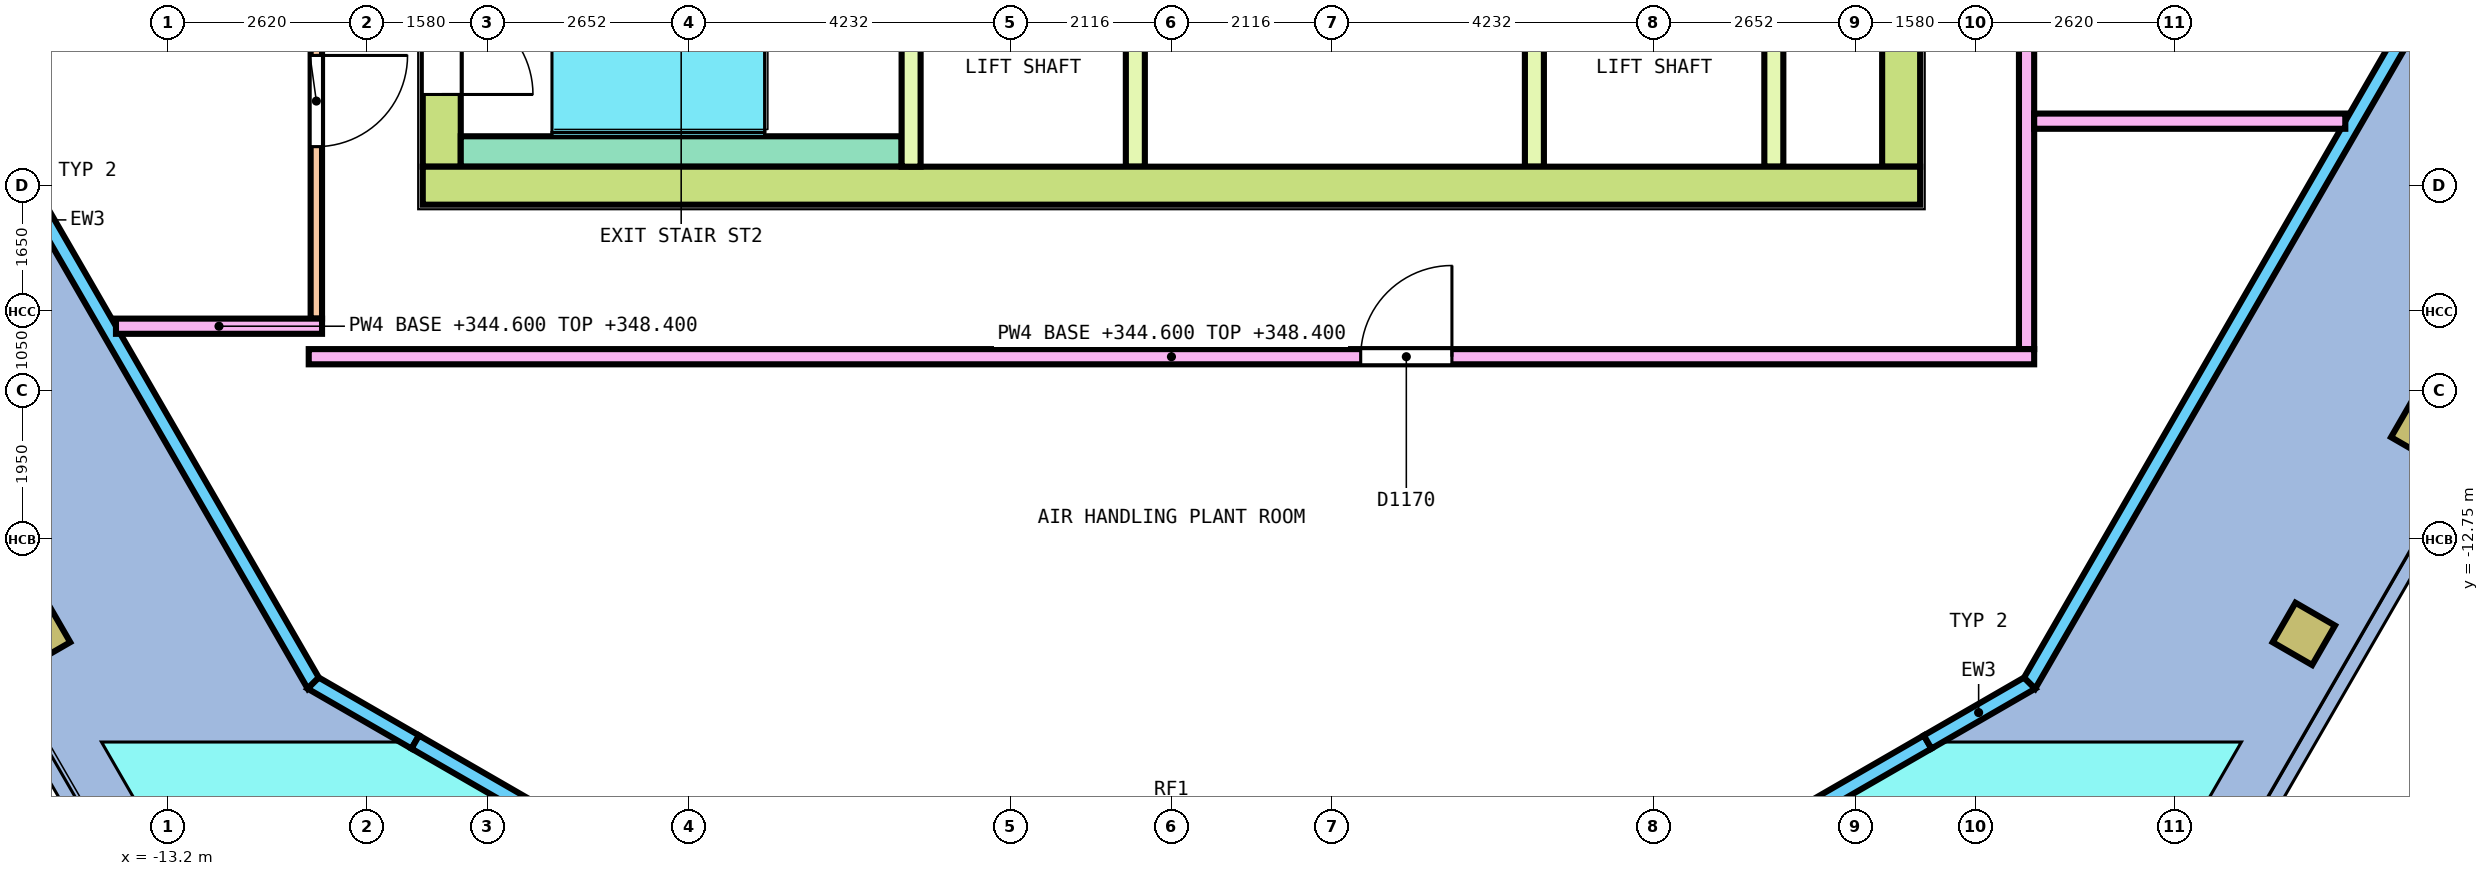
"""IFC4 building model, lengths in metres.
Left out: names, types, materials, properties, quantities, classifications, styles, units other than length and angle.
Written with IfcOpenShell. Run it as: python <this file> out.ifc"""

import sys

from ifc_helpers import new_model, si_unit, direction, frame, frame_2d, origin, origin_2d, place, context, subcontext, project, spatial, polyline, rectangle, hollow_rectangle, outline, extrude, element, fill, save


model = new_model("IFC4")
c1 = context("Model", 3, precision=1e-05, world=origin(), true_north=direction((0.0, 1.0)))
c2 = subcontext(c1, "Body", "Model", "MODEL_VIEW")
j1 = project(units=[si_unit("LENGTHUNIT", "METRE"), si_unit("PLANEANGLEUNIT", "RADIAN")], contexts=[c1])
p1 = place(None, origin())
s1 = spatial("IfcSite", under=j1, at=p1, CompositionType="ELEMENT")
p2 = place(p1, origin())
s2 = spatial("IfcBuilding", under=s1, at=p2, CompositionType="ELEMENT")
p3 = place(p2, frame((0.0, 0.0, 344.6)))
s3 = spatial("IfcBuildingStorey", under=s2, at=p3, CompositionType="ELEMENT", Elevation=344.6)
for number, where, z_axis, x_axis in (
    (1, (-14.898, -13.996, 0.0), (0.0, 0.0, 1.0), (0.5, -0.866, 0.0)),
    (2, (14.898, -13.996, 0.0), (0.0, 0.0, 1.0), (0.5, 0.866, 0.0)),
    (3, (16.455, -11.299, 0.0), (0.0, 0.0, 1.0), (0.5, 0.866, 0.0)),
):
    element("IfcColumn", number, at=place(p3, frame(where, z_axis=z_axis, x_axis=x_axis)), inside=s3, PredefinedType="COLUMN", context=c2, shape_type="SweptSolid", body=[
        extrude(hollow_rectangle(XDim=0.6, YDim=0.6, WallThickness=0.04, InnerFilletRadius=0.04, OuterFilletRadius=0.08, at=origin_2d()), origin(), (0.0, 0.0, 1.0), 4.0),
    ])
p4 = place(p3, frame((-18.327, -2.456, 0.0), z_axis=(0.0, 0.0, 1.0), x_axis=(0.499991740577, -0.866030172312, 0.0)))
e4 = element("IfcWall", 4, at=p4, inside=s3, PredefinedType="SOLIDWALL", context=c2, shape_type="SweptSolid", body=[
    extrude(outline(polyline([(-0.027, -0.1), (14.101, -0.1), (14.047, 0.1), (0.027, 0.1), (-0.027, -0.1)])), origin(), (0.0, 0.0, 1.0), 3.8),
])
p5 = place(p3, frame((-11.291, -14.644, 0.0), z_axis=(0.0, 0.0, 1.0), x_axis=(0.866004557827, -0.500036104519, 0.0)))
e5 = element("IfcWall", 5, at=p5, inside=s3, PredefinedType="SOLIDWALL", context=c2, shape_type="SweptSolid", body=[
    extrude(outline(polyline([(-0.027, -0.1), (1.55, -0.1), (1.55, 0.1), (0.027, 0.1), (-0.027, -0.1)])), origin(), (0.0, 0.0, 1.0), 3.8),
])
p6 = place(p3, frame((-9.948, -15.419, 0.0), z_axis=(0.0, 0.0, 1.0), x_axis=(0.866022320763, -0.500005339912, 0.0)))
e6 = element("IfcWall", 6, at=p6, inside=s3, PredefinedType="SOLIDWALL", context=c2, shape_type="SweptSolid", body=[
    extrude(outline(polyline([(0.0, 0.0), (3.362, 0.0), (3.362, 0.225), (0.0, 4.0), (0.0, 0.0)])), frame((0.0, 0.1, 0.0), z_axis=(0.0, -1.0, 0.0), x_axis=(1.0, 0.0, 0.0)), (0.0, 0.0, 1.0), 0.2),
])
p7 = place(p3, frame((7.037, -17.1, 0.0), z_axis=(0.0, 0.0, 1.0), x_axis=(0.866022320763, 0.500005339912, 0.0)))
e7 = element("IfcWall", 7, at=p7, inside=s3, PredefinedType="SOLIDWALL", context=c2, shape_type="SweptSolid", body=[
    extrude(outline(polyline([(0.0, 0.0), (3.362, 0.0), (3.362, 4.0), (0.0, 0.225), (0.0, 0.0)])), frame((0.0, 0.1, 0.0), z_axis=(0.0, -1.0, 0.0), x_axis=(1.0, 0.0, 0.0)), (0.0, 0.0, 1.0), 0.2),
])
p8 = place(p3, frame((9.948, -15.419, 0.0), z_axis=(0.0, 0.0, 1.0), x_axis=(0.866004557827, 0.500036104519, 0.0)))
e8 = element("IfcWall", 8, at=p8, inside=s3, PredefinedType="SOLIDWALL", context=c2, shape_type="SweptSolid", body=[
    extrude(outline(polyline([(0.0, -0.1), (1.577, -0.1), (1.523, 0.1), (0.0, 0.1), (0.0, -0.1)])), origin(), (0.0, 0.0, 1.0), 3.8),
])
p9 = place(p3, frame((11.291, -14.644, 0.0), z_axis=(0.0, 0.0, 1.0), x_axis=(0.499991740577, 0.866030172312, 0.0)))
e9 = element("IfcWall", 9, at=p9, inside=s3, PredefinedType="SOLIDWALL", context=c2, shape_type="SweptSolid", body=[
    extrude(outline(polyline([(-0.027, -0.1), (14.101, -0.1), (14.047, 0.1), (0.027, 0.1), (-0.027, -0.1)])), origin(), (0.0, 0.0, 1.0), 3.8),
])
p10 = place(p3, frame((-9.85, -8.1, 0.0), z_axis=(0.0, 0.0, 1.0), x_axis=(1.0, 0.0, 0.0)))
e10 = element("IfcWall", 10, at=p10, inside=s3, PredefinedType="SHEAR", context=c2, shape_type="SweptSolid", body=[
    extrude(rectangle(XDim=19.7, YDim=0.5, at=frame_2d((9.85, 0.0))), origin(), (0.0, 0.0, 1.0), 3.8),
])
p11 = place(p3, frame((-9.6, -7.85, 0.0), z_axis=(0.0, 0.0, 1.0), x_axis=(0.0, 1.0, 0.0)))
e11 = element("IfcWall", 11, at=p11, inside=s3, PredefinedType="SHEAR", context=c2, shape_type="SweptSolid", body=[
    extrude(rectangle(XDim=15.7, YDim=0.5, at=frame_2d((7.85, 0.0))), origin(), (0.0, 0.0, 1.0), 3.8),
])
p12 = place(p11, frame((6.65, 0.0, 0.0)))
e12 = element("IfcOpeningElement", 12, at=p12, cuts=e11, PredefinedType="OPENING", context=c2, shape_type="SweptSolid", body=[
    extrude(rectangle(XDim=2.4, YDim=2.1, at=frame_2d((1.2, 1.05))), frame((0.0, 0.26, 0.0), z_axis=(0.0, -1.0, 0.0), x_axis=(1.0, 0.0, 0.0)), (0.0, 0.0, 1.0), 0.52),
])
p13 = place(p11, frame((13.55, 0.0, 0.0)))
e13 = element("IfcOpeningElement", 13, at=p13, cuts=e11, PredefinedType="OPENING", context=c2, shape_type="SweptSolid", body=[
    extrude(rectangle(XDim=1.2, YDim=2.1, at=frame_2d((0.6, 1.05))), frame((0.0, 0.26, 0.0), z_axis=(0.0, -1.0, 0.0), x_axis=(1.0, 0.0, 0.0)), (0.0, 0.0, 1.0), 0.52),
])
p14 = place(p11, frame((0.95, 0.0, 0.0)))
e14 = element("IfcOpeningElement", 14, at=p14, cuts=e11, PredefinedType="OPENING", context=c2, shape_type="SweptSolid", body=[
    extrude(rectangle(XDim=1.2, YDim=2.1, at=frame_2d((0.6, 1.05))), frame((0.0, 0.26, 0.0), z_axis=(0.0, -1.0, 0.0), x_axis=(1.0, 0.0, 0.0)), (0.0, 0.0, 1.0), 0.52),
])
p15 = place(p3, frame((9.6, -7.85, 0.0), z_axis=(0.0, 0.0, 1.0), x_axis=(0.0, 1.0, 0.0)))
e15 = element("IfcWall", 15, at=p15, inside=s3, PredefinedType="SHEAR", context=c2, shape_type="SweptSolid", body=[
    extrude(rectangle(XDim=15.7, YDim=0.5, at=frame_2d((7.85, 0.0))), origin(), (0.0, 0.0, 1.0), 3.8),
])
p16 = place(p15, frame((6.65, 0.0, 0.0)))
e16 = element("IfcOpeningElement", 16, at=p16, cuts=e15, PredefinedType="OPENING", context=c2, shape_type="SweptSolid", body=[
    extrude(rectangle(XDim=2.4, YDim=2.1, at=frame_2d((1.2, 1.05))), frame((0.0, 0.26, 0.0), z_axis=(0.0, -1.0, 0.0), x_axis=(1.0, 0.0, 0.0)), (0.0, 0.0, 1.0), 0.52),
])
p17 = place(p15, frame((13.55, 0.0, 0.0)))
e17 = element("IfcOpeningElement", 17, at=p17, cuts=e15, PredefinedType="OPENING", context=c2, shape_type="SweptSolid", body=[
    extrude(rectangle(XDim=1.2, YDim=2.1, at=frame_2d((0.6, 1.05))), frame((0.0, 0.26, 0.0), z_axis=(0.0, -1.0, 0.0), x_axis=(1.0, 0.0, 0.0)), (0.0, 0.0, 1.0), 0.52),
])
p18 = place(p3, frame((-9.35, -7.65, 0.0), z_axis=(0.0, 0.0, 1.0), x_axis=(1.0, 0.0, 0.0)))
e18 = element("IfcWall", 18, at=p18, inside=s3, PredefinedType="SOLIDWALL", context=c2, shape_type="SweptSolid", body=[
    extrude(rectangle(XDim=5.8, YDim=0.4, at=frame_2d((2.9, 0.0))), origin(), (0.0, 0.0, 1.0), 3.8),
])
for number, where, z_axis, x_axis in (
    (19, (-3.425, -7.85, 0.0), (0.0, 0.0, 1.0), (0.0, 1.0, 0.0)),
    (20, (-0.475, -7.85, 0.0), (0.0, 0.0, 1.0), (0.0, 1.0, 0.0)),
    (21, (4.775, -7.85, 0.0), (0.0, 0.0, 1.0), (0.0, 1.0, 0.0)),
    (22, (7.925, -7.85, 0.0), (0.0, 0.0, 1.0), (0.0, 1.0, 0.0)),
):
    element("IfcWall", number, at=place(p3, frame(where, z_axis=z_axis, x_axis=x_axis)), inside=s3, PredefinedType="SOLIDWALL", context=c2, shape_type="SweptSolid", body=[
        extrude(rectangle(XDim=2.95, YDim=0.25, at=frame_2d((1.475, 0.0))), origin(), (0.0, 0.0, 1.0), 3.8),
    ])
p19 = place(p3, frame((-11.25, -9.849, 0.0), z_axis=(0.0, 0.0, 1.0), x_axis=(0.0, 1.0, 0.0)))
e23 = element("IfcWall", 23, at=p19, inside=s3, PredefinedType="PARTITIONING", context=c2, shape_type="SweptSolid", body=[
    extrude(rectangle(XDim=17.0, YDim=0.15, at=frame_2d((8.5, 0.0))), origin(), (0.0, 0.0, 1.0), 3.3),
])
p20 = place(p19, frame((14.212, 0.0, 0.0)))
e24 = element("IfcOpeningElement", 24, at=p20, cuts=e23, PredefinedType="OPENING", context=c2, shape_type="SweptSolid", body=[
    extrude(rectangle(XDim=1.2, YDim=2.1, at=frame_2d((0.6, 1.05))), frame((0.0, 0.085, 0.0), z_axis=(0.0, -1.0, 0.0), x_axis=(1.0, 0.0, 0.0)), (0.0, 0.0, 1.0), 0.17),
])
p21 = place(p19, frame((2.262, 0.0, 0.0)))
e25 = element("IfcOpeningElement", 25, at=p21, cuts=e23, PredefinedType="OPENING", context=c2, shape_type="SweptSolid", body=[
    extrude(rectangle(XDim=1.2, YDim=2.1, at=frame_2d((0.6, 1.05))), frame((0.0, 0.085, 0.0), z_axis=(0.0, -1.0, 0.0), x_axis=(1.0, 0.0, 0.0)), (0.0, 0.0, 1.0), 0.17),
])
p22 = place(p3, frame((11.25, -10.25, 0.0), z_axis=(0.0, 0.0, 1.0), x_axis=(0.0, 1.0, 0.0)))
e26 = element("IfcWall", 26, at=p22, inside=s3, PredefinedType="PARTITIONING", context=c2, shape_type="SweptSolid", body=[
    extrude(rectangle(XDim=20.099, YDim=0.2, at=frame_2d((10.049, 0.0))), origin(), (0.0, 0.0, 1.0), 3.3),
])
p23 = place(p22, frame((17.407, 0.0, 0.0)))
e27 = element("IfcOpeningElement", 27, at=p23, cuts=e26, PredefinedType="OPENING", context=c2, shape_type="SweptSolid", body=[
    extrude(rectangle(XDim=1.0, YDim=2.1, at=frame_2d((0.5, 1.05))), frame((0.0, 0.11, 0.0), z_axis=(0.0, -1.0, 0.0), x_axis=(1.0, 0.0, 0.0)), (0.0, 0.0, 1.0), 0.22),
])
p24 = place(p22, frame((9.224, 0.0, 0.0)))
e28 = element("IfcOpeningElement", 28, at=p24, cuts=e26, PredefinedType="OPENING", context=c2, shape_type="SweptSolid", body=[
    extrude(rectangle(XDim=1.2, YDim=2.1, at=frame_2d((0.6, 1.05))), frame((0.0, 0.11, 0.0), z_axis=(0.0, -1.0, 0.0), x_axis=(1.0, 0.0, 0.0)), (0.0, 0.0, 1.0), 0.22),
])
p25 = place(p3, frame((-11.35, -10.35, 0.0), z_axis=(0.0, 0.0, 1.0), x_axis=(1.0, 0.0, 0.0)))
e29 = element("IfcWall", 29, at=p25, inside=s3, PredefinedType="PARTITIONING", context=c2, shape_type="SweptSolid", body=[
    extrude(rectangle(XDim=22.7, YDim=0.2, at=frame_2d((11.35, 0.0))), origin(), (0.0, 0.0, 1.0), 3.8),
])
p26 = place(p25, frame((13.84, 0.0, 0.0)))
e30 = element("IfcOpeningElement", 30, at=p26, cuts=e29, PredefinedType="OPENING", context=c2, shape_type="SweptSolid", body=[
    extrude(rectangle(XDim=1.2, YDim=2.1, at=frame_2d((0.6, 1.05))), frame((0.0, 0.11, 0.0), z_axis=(0.0, -1.0, 0.0), x_axis=(1.0, 0.0, 0.0)), (0.0, 0.0, 1.0), 0.22),
])
p27 = place(p3, frame((-13.886, -9.949, 0.0), z_axis=(0.0, 0.0, 1.0), x_axis=(1.0, 0.0, 0.0)))
e31 = element("IfcWall", 31, at=p27, inside=s3, PredefinedType="PARTITIONING", context=c2, shape_type="SweptSolid", body=[
    extrude(rectangle(XDim=2.711, YDim=0.2, at=frame_2d((1.355, 0.0))), origin(), (0.0, 0.0, 1.0), 3.8),
])
p28 = place(p3, frame((11.35, -7.251, 0.0), z_axis=(0.0, 0.0, 1.0), x_axis=(1.0, 0.0, 0.0)))
e32 = element("IfcWall", 32, at=p28, inside=s3, PredefinedType="PARTITIONING", context=c2, shape_type="SweptSolid", body=[
    extrude(rectangle(XDim=4.093, YDim=0.2, at=frame_2d((2.047, 0.0))), origin(), (0.0, 0.0, 1.0), 3.3),
])
p29 = place(p14, origin())
e33 = element("IfcDoor", 33, at=p29, inside=s3, OperationType="SINGLE_SWING_RIGHT", PredefinedType="DOOR", context=c2, shape_type="SweptSolid", body=[
    extrude(rectangle(XDim=1.2, YDim=2.1, at=frame_2d((0.6, 1.05))), frame((0.0, 0.2, 0.0), z_axis=(0.0, -1.0, 0.0), x_axis=(1.0, 0.0, 0.0)), (0.0, 0.0, 1.0), 0.4),
])
fill(e14, e33)
p30 = place(p21, origin())
e34 = element("IfcDoor", 34, at=p30, inside=s3, OperationType="DOUBLE_DOOR_SINGLE_SWING", PredefinedType="DOOR", context=c2, shape_type="SweptSolid", body=[
    extrude(rectangle(XDim=1.2, YDim=2.1, at=frame_2d((0.6, 1.05))), frame((0.0, 0.025, 0.0), z_axis=(0.0, -1.0, 0.0), x_axis=(1.0, 0.0, 0.0)), (0.0, 0.0, 1.0), 0.05),
])
fill(e25, e34)
p31 = place(p26, origin())
e35 = element("IfcDoor", 35, at=p31, inside=s3, OperationType="DOUBLE_DOOR_SINGLE_SWING", PredefinedType="DOOR", context=c2, shape_type="SweptSolid", body=[
    extrude(rectangle(XDim=1.2, YDim=2.1, at=frame_2d((0.6, 1.05))), frame((0.0, 0.025, 0.0), z_axis=(0.0, -1.0, 0.0), x_axis=(1.0, 0.0, 0.0)), (0.0, 0.0, 1.0), 0.05),
])
fill(e30, e35)
save(model, sys.argv[1])
